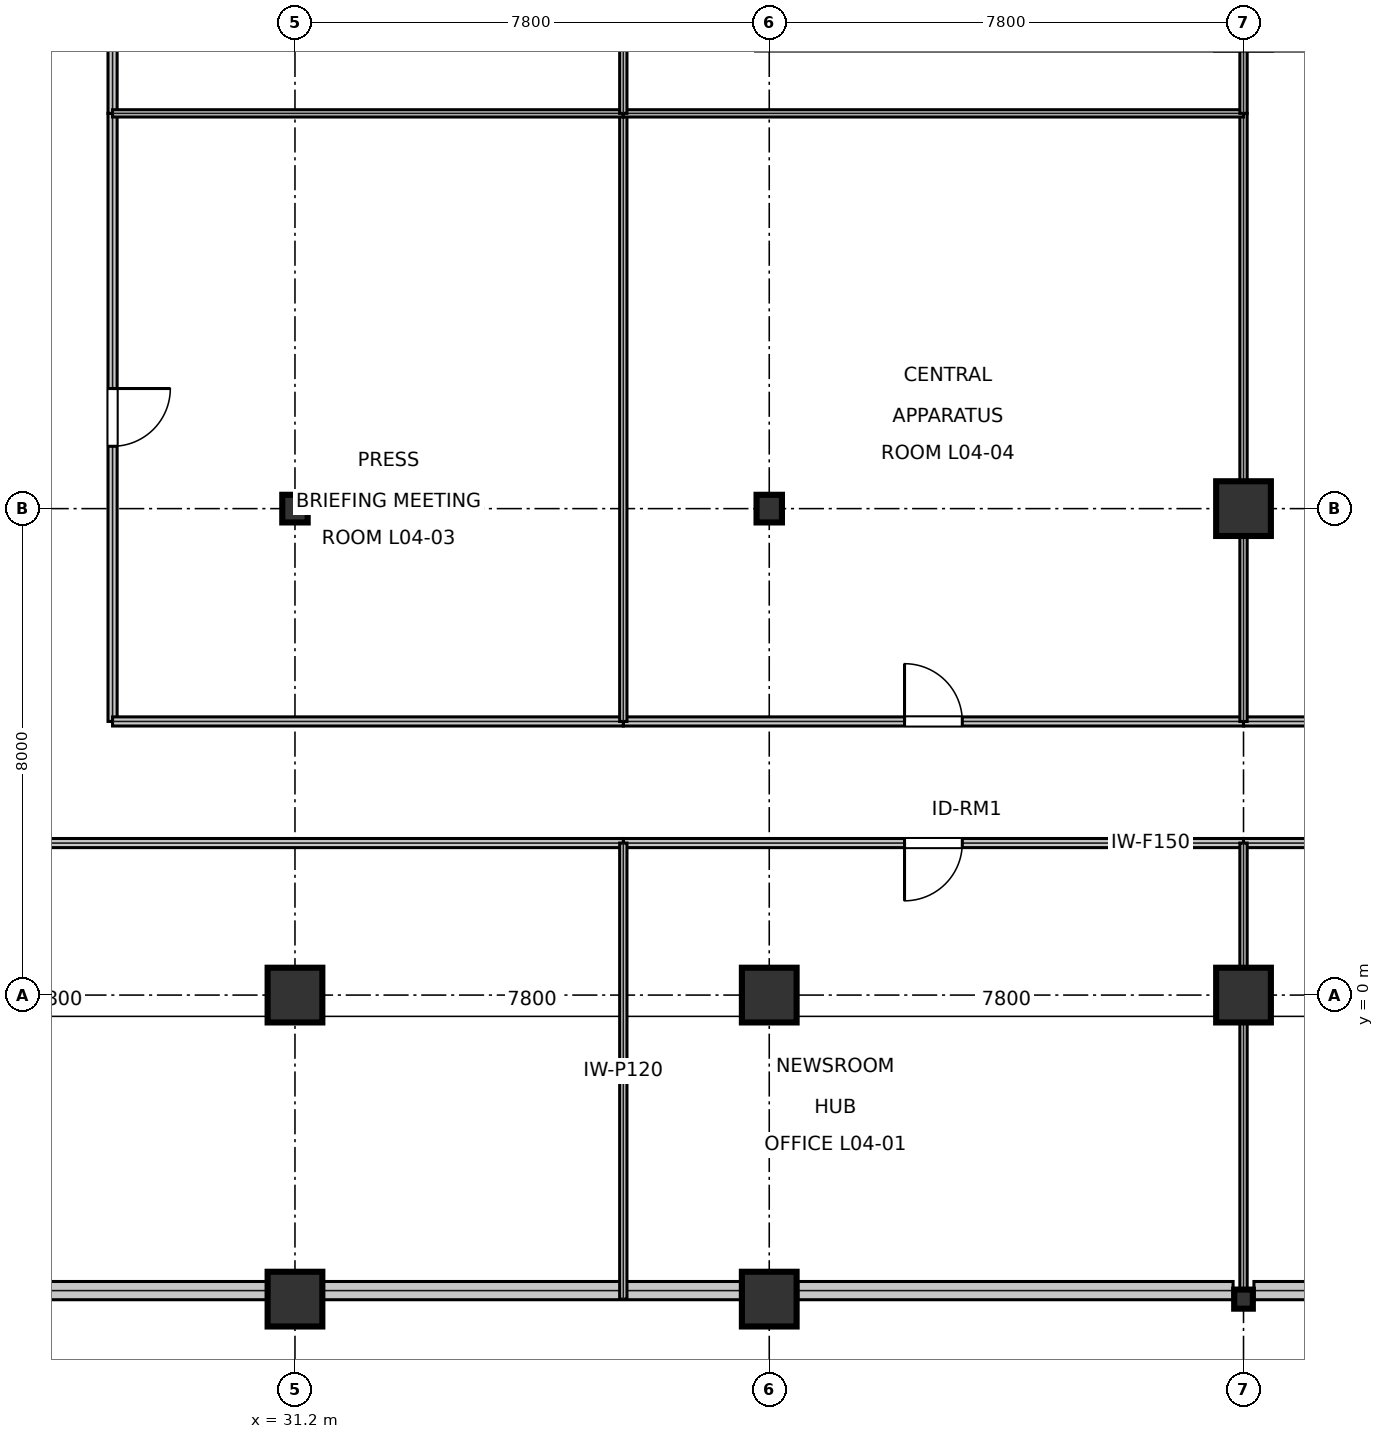
"""IFC4 building model, lengths in metres.
Left out: names, types, materials, properties, quantities, classifications, styles, units other than length and angle.
Written with IfcOpenShell. Run it as: python <this file> out.ifc"""

import sys

from ifc_helpers import new_model, si_unit, direction, frame, frame_2d, origin, origin_2d, place, context, subcontext, project, spatial, rectangle, i_section, extrude, element, fill, save


model = new_model("IFC4")
c1 = context("Model", 3, precision=1e-05, world=origin(), true_north=direction((0.0, 1.0)))
c2 = subcontext(c1, "Body", "Model", "MODEL_VIEW")
j1 = project(units=[si_unit("LENGTHUNIT", "METRE"), si_unit("PLANEANGLEUNIT", "RADIAN")], contexts=[c1])
p1 = place(None, origin())
s1 = spatial("IfcSite", under=j1, at=p1, CompositionType="ELEMENT")
p2 = place(p1, origin())
s2 = spatial("IfcBuilding", under=s1, at=p2, CompositionType="ELEMENT")
p3 = place(p2, frame((0.0, 0.0, 21.6)))
s3 = spatial("IfcBuildingStorey", under=s2, at=p3, CompositionType="ELEMENT", Elevation=21.6)
for number, where, z_axis, x_axis in (
    (1, (31.2, -5.0, 0.0), (0.0, 0.0, 1.0), (1.0, 0.0, 0.0)),
    (2, (31.2, 0.0, 0.0), (0.0, 0.0, 1.0), (1.0, 0.0, 0.0)),
):
    element("IfcColumn", number, at=place(p3, frame(where, z_axis=z_axis, x_axis=x_axis)), inside=s3, PredefinedType="COLUMN", context=c2, shape_type="SweptSolid", body=[
        extrude(rectangle(XDim=0.9, YDim=0.9, at=origin_2d()), origin(), (0.0, 0.0, 1.0), 5.395),
    ])
p4 = place(p3, frame((31.2, 8.0, 0.0), z_axis=(0.0, 0.0, 1.0), x_axis=(1.0, 0.0, 0.0)))
e3 = element("IfcColumn", 3, at=p4, inside=s3, PredefinedType="COLUMN", context=c2, shape_type="SweptSolid", body=[
    extrude(i_section(OverallWidth=0.418, OverallDepth=0.455, WebThickness=0.042, FlangeThickness=0.068, at=origin_2d()), origin(), (0.0, 0.0, 1.0), 5.395),
])
for number, where, z_axis, x_axis in (
    (4, (39.0, -5.0, 0.0), (0.0, 0.0, 1.0), (1.0, 0.0, 0.0)),
    (5, (39.0, 0.0, 0.0), (0.0, 0.0, 1.0), (1.0, 0.0, 0.0)),
):
    element("IfcColumn", number, at=place(p3, frame(where, z_axis=z_axis, x_axis=x_axis)), inside=s3, PredefinedType="COLUMN", context=c2, shape_type="SweptSolid", body=[
        extrude(rectangle(XDim=0.9, YDim=0.9, at=origin_2d()), origin(), (0.0, 0.0, 1.0), 5.395),
    ])
p5 = place(p3, frame((39.0, 8.0, 0.0), z_axis=(0.0, 0.0, 1.0), x_axis=(1.0, 0.0, 0.0)))
e6 = element("IfcColumn", 6, at=p5, inside=s3, PredefinedType="COLUMN", context=c2, shape_type="SweptSolid", body=[
    extrude(i_section(OverallWidth=0.418, OverallDepth=0.455, WebThickness=0.042, FlangeThickness=0.068, at=origin_2d()), origin(), (0.0, 0.0, 1.0), 5.395),
])
p6 = place(p3, frame((46.8, -5.0, 0.0), z_axis=(0.0, 0.0, 1.0), x_axis=(1.0, 0.0, 0.0)))
e7 = element("IfcColumn", 7, at=p6, inside=s3, PredefinedType="COLUMN", context=c2, shape_type="SweptSolid", body=[
    extrude(i_section(OverallWidth=0.307, OverallDepth=0.314, WebThickness=0.011, FlangeThickness=0.019, at=origin_2d()), origin(), (0.0, 0.0, 1.0), 5.395),
])
for number, where, z_axis, x_axis in (
    (8, (46.8, 0.0, 0.0), (0.0, 0.0, 1.0), (1.0, 0.0, 0.0)),
    (9, (46.8, 8.0, 0.0), (0.0, 0.0, 1.0), (1.0, 0.0, 0.0)),
):
    element("IfcColumn", number, at=place(p3, frame(where, z_axis=z_axis, x_axis=x_axis)), inside=s3, PredefinedType="COLUMN", context=c2, shape_type="SweptSolid", body=[
        extrude(rectangle(XDim=0.9, YDim=0.9, at=origin_2d()), origin(), (0.0, 0.0, 1.0), 5.395),
    ])
for number, where, z_axis, x_axis in (
    (10, (23.868, -4.86, 0.0), (0.0, 0.0, 1.0), (1.0, 0.0, 0.0)),
    (11, (31.668, -4.86, 0.0), (0.0, 0.0, 1.0), (1.0, 0.0, 0.0)),
):
    element("IfcWall", number, at=place(p3, frame(where, z_axis=z_axis, x_axis=x_axis)), inside=s3, PredefinedType="STANDARD", context=c2, shape_type="SweptSolid", body=[
        extrude(rectangle(XDim=6.864, YDim=0.3, at=frame_2d((3.432, 0.0))), origin(), (0.0, 0.0, 1.0), 4.608),
    ])
p7 = place(p3, frame((39.468, -4.86, 0.0), z_axis=(0.0, 0.0, 1.0), x_axis=(1.0, 0.0, 0.0)))
e12 = element("IfcWall", 12, at=p7, inside=s3, PredefinedType="STANDARD", context=c2, shape_type="SweptSolid", body=[
    extrude(rectangle(XDim=7.16, YDim=0.3, at=frame_2d((3.58, 0.0))), origin(), (0.0, 0.0, 1.0), 4.608),
])
p8 = place(p3, frame((46.971, -4.86, 0.0), z_axis=(0.0, 0.0, 1.0), x_axis=(1.0, 0.0, 0.0)))
e13 = element("IfcWall", 13, at=p8, inside=s3, PredefinedType="STANDARD", context=c2, shape_type="SweptSolid", body=[
    extrude(rectangle(XDim=7.161, YDim=0.3, at=frame_2d((3.58, 0.0))), origin(), (0.0, 0.0, 1.0), 4.608),
])
p9 = place(p3, frame((36.6, 2.5, 0.0), z_axis=(0.0, 0.0, 1.0), x_axis=(1.0, 0.0, 0.0)))
e14 = element("IfcWall", 14, at=p9, inside=s3, PredefinedType="PARTITIONING", context=c2, shape_type="SweptSolid", body=[
    extrude(rectangle(XDim=10.2, YDim=0.15, at=frame_2d((5.1, 0.0))), origin(), (0.0, 0.0, 1.0), 4.375),
])
p10 = place(p9, frame((4.625, 0.0, 0.0)))
e15 = element("IfcOpeningElement", 15, at=p10, cuts=e14, PredefinedType="OPENING", context=c2, shape_type="SweptSolid", body=[
    extrude(rectangle(XDim=0.95, YDim=2.15, at=frame_2d((0.475, 1.075))), frame((0.0, 0.085, 0.0), z_axis=(0.0, -1.0, 0.0), x_axis=(1.0, 0.0, 0.0)), (0.0, 0.0, 1.0), 0.17),
])
p11 = place(p3, frame((28.2, 4.5, 0.0), z_axis=(0.0, 0.0, 1.0), x_axis=(0.0, 1.0, 0.0)))
e16 = element("IfcWall", 16, at=p11, inside=s3, PredefinedType="PARTITIONING", context=c2, shape_type="SweptSolid", body=[
    extrude(rectangle(XDim=10.0, YDim=0.15, at=frame_2d((5.0, 0.0))), origin(), (0.0, 0.0, 1.0), 4.298),
])
p12 = place(p11, frame((4.525, 0.0, 0.0)))
e17 = element("IfcOpeningElement", 17, at=p12, cuts=e16, PredefinedType="OPENING", context=c2, shape_type="SweptSolid", body=[
    extrude(rectangle(XDim=0.95, YDim=2.15, at=frame_2d((0.475, 1.075))), frame((0.0, 0.085, 0.0), z_axis=(0.0, -1.0, 0.0), x_axis=(1.0, 0.0, 0.0)), (0.0, 0.0, 1.0), 0.17),
])
p13 = place(p3, frame((36.6, 4.5, 0.0), z_axis=(0.0, 0.0, 1.0), x_axis=(1.0, 0.0, 0.0)))
e18 = element("IfcWall", 18, at=p13, inside=s3, PredefinedType="PARTITIONING", context=c2, shape_type="SweptSolid", body=[
    extrude(rectangle(XDim=10.2, YDim=0.15, at=frame_2d((5.1, 0.0))), origin(), (0.0, 0.0, 1.0), 4.375),
])
p14 = place(p13, frame((4.625, 0.0, 0.0)))
e19 = element("IfcOpeningElement", 19, at=p14, cuts=e18, PredefinedType="OPENING", context=c2, shape_type="SweptSolid", body=[
    extrude(rectangle(XDim=0.95, YDim=2.15, at=frame_2d((0.475, 1.075))), frame((0.0, 0.085, 0.0), z_axis=(0.0, -1.0, 0.0), x_axis=(1.0, 0.0, 0.0)), (0.0, 0.0, 1.0), 0.17),
])
p15 = place(p3, frame((46.8, 4.5, 0.0), z_axis=(0.0, 0.0, 1.0), x_axis=(1.0, 0.0, 0.0)))
e20 = element("IfcWall", 20, at=p15, inside=s3, PredefinedType="PARTITIONING", context=c2, shape_type="SweptSolid", body=[
    extrude(rectangle(XDim=5.7, YDim=0.15, at=frame_2d((2.85, 0.0))), origin(), (0.0, 0.0, 1.0), 4.375),
])
p16 = place(p15, frame((2.375, 0.0, 0.0)))
e21 = element("IfcOpeningElement", 21, at=p16, cuts=e20, PredefinedType="OPENING", context=c2, shape_type="SweptSolid", body=[
    extrude(rectangle(XDim=0.95, YDim=2.15, at=frame_2d((0.475, 1.075))), frame((0.0, 0.085, 0.0), z_axis=(0.0, -1.0, 0.0), x_axis=(1.0, 0.0, 0.0)), (0.0, 0.0, 1.0), 0.17),
])
p17 = place(p3, frame((28.2, 14.5, 0.0), z_axis=(0.0, 0.0, 1.0), x_axis=(0.0, 1.0, 0.0)))
e22 = element("IfcWall", 22, at=p17, inside=s3, PredefinedType="PARTITIONING", context=c2, shape_type="SweptSolid", body=[
    extrude(rectangle(XDim=11.7, YDim=0.15, at=frame_2d((5.85, 0.0))), origin(), (0.0, 0.0, 1.0), 3.648),
])
p18 = place(p17, frame((5.375, 0.0, 0.0)))
e23 = element("IfcOpeningElement", 23, at=p18, cuts=e22, PredefinedType="OPENING", context=c2, shape_type="SweptSolid", body=[
    extrude(rectangle(XDim=0.95, YDim=2.15, at=frame_2d((0.475, 1.075))), frame((0.0, 0.085, 0.0), z_axis=(0.0, -1.0, 0.0), x_axis=(1.0, 0.0, 0.0)), (0.0, 0.0, 1.0), 0.17),
])
p19 = place(p3, frame((26.2, 2.5, 0.0), z_axis=(0.0, 0.0, 1.0), x_axis=(1.0, 0.0, 0.0)))
e24 = element("IfcWall", 24, at=p19, inside=s3, PredefinedType="PARTITIONING", context=c2, shape_type="SweptSolid", body=[
    extrude(rectangle(XDim=10.4, YDim=0.15, at=frame_2d((5.2, 0.0))), origin(), (0.0, 0.0, 1.0), 4.375),
])
p20 = place(p3, frame((28.2, 4.5, 0.0), z_axis=(0.0, 0.0, 1.0), x_axis=(1.0, 0.0, 0.0)))
e25 = element("IfcWall", 25, at=p20, inside=s3, PredefinedType="PARTITIONING", context=c2, shape_type="SweptSolid", body=[
    extrude(rectangle(XDim=8.4, YDim=0.15, at=frame_2d((4.2, 0.0))), origin(), (0.0, 0.0, 1.0), 4.375),
])
p21 = place(p3, frame((46.8, 2.5, 0.0), z_axis=(0.0, 0.0, 1.0), x_axis=(1.0, 0.0, 0.0)))
e26 = element("IfcWall", 26, at=p21, inside=s3, PredefinedType="PARTITIONING", context=c2, shape_type="SweptSolid", body=[
    extrude(rectangle(XDim=5.7, YDim=0.15, at=frame_2d((2.85, 0.0))), origin(), (0.0, 0.0, 1.0), 4.375),
])
for number, where, z_axis, x_axis in (
    (27, (36.6, -5.0, 0.0), (0.0, 0.0, 1.0), (0.0, 1.0, 0.0)),
    (28, (46.8, -5.0, 0.0), (0.0, 0.0, 1.0), (0.0, 1.0, 0.0)),
):
    element("IfcWall", number, at=place(p3, frame(where, z_axis=z_axis, x_axis=x_axis)), inside=s3, PredefinedType="PARTITIONING", context=c2, shape_type="SweptSolid", body=[
        extrude(rectangle(XDim=7.5, YDim=0.12, at=frame_2d((3.75, 0.0))), origin(), (0.0, 0.0, 1.0), 4.298),
    ])
p22 = place(p3, frame((36.6, 4.5, 0.0), z_axis=(0.0, 0.0, 1.0), x_axis=(0.0, 1.0, 0.0)))
e29 = element("IfcWall", 29, at=p22, inside=s3, PredefinedType="PARTITIONING", context=c2, shape_type="SweptSolid", body=[
    extrude(rectangle(XDim=10.0, YDim=0.12, at=frame_2d((5.0, 0.0))), origin(), (0.0, 0.0, 1.0), 4.298),
])
p23 = place(p3, frame((28.2, 14.5, 0.0), z_axis=(0.0, 0.0, 1.0), x_axis=(1.0, 0.0, 0.0)))
e30 = element("IfcWall", 30, at=p23, inside=s3, PredefinedType="PARTITIONING", context=c2, shape_type="SweptSolid", body=[
    extrude(rectangle(XDim=8.4, YDim=0.12, at=frame_2d((4.2, 0.0))), origin(), (0.0, 0.0, 1.0), 3.648),
])
p24 = place(p3, frame((46.8, 4.5, 0.0), z_axis=(0.0, 0.0, 1.0), x_axis=(0.0, 1.0, 0.0)))
e31 = element("IfcWall", 31, at=p24, inside=s3, PredefinedType="PARTITIONING", context=c2, shape_type="SweptSolid", body=[
    extrude(rectangle(XDim=10.0, YDim=0.12, at=frame_2d((5.0, 0.0))), origin(), (0.0, 0.0, 1.0), 4.298),
])
p25 = place(p3, frame((36.6, 14.5, 0.0), z_axis=(0.0, 0.0, 1.0), x_axis=(1.0, 0.0, 0.0)))
e32 = element("IfcWall", 32, at=p25, inside=s3, PredefinedType="PARTITIONING", context=c2, shape_type="SweptSolid", body=[
    extrude(rectangle(XDim=10.2, YDim=0.12, at=frame_2d((5.1, 0.0))), origin(), (0.0, 0.0, 1.0), 4.375),
])
p26 = place(p3, frame((46.8, 14.5, 0.0), z_axis=(0.0, 0.0, 1.0), x_axis=(0.0, 1.0, 0.0)))
e33 = element("IfcWall", 33, at=p26, inside=s3, PredefinedType="PARTITIONING", context=c2, shape_type="SweptSolid", body=[
    extrude(rectangle(XDim=1.1, YDim=0.12, at=frame_2d((0.55, 0.0))), origin(), (0.0, 0.0, 1.0), 4.375),
])
p27 = place(p3, frame((36.6, 14.5, 0.0), z_axis=(0.0, 0.0, 1.0), x_axis=(0.0, 1.0, 0.0)))
e34 = element("IfcWall", 34, at=p27, inside=s3, PredefinedType="PARTITIONING", context=c2, shape_type="SweptSolid", body=[
    extrude(rectangle(XDim=11.7, YDim=0.12, at=frame_2d((5.85, 0.0))), origin(), (0.0, 0.0, 1.0), 3.648),
])
p28 = place(p10, frame((0.95, 0.0, 0.0), z_axis=(0.0, 0.0, 1.0), x_axis=(-1.0, 0.0, 0.0)))
e35 = element("IfcDoor", 35, at=p28, inside=s3, OperationType="SINGLE_SWING_RIGHT", PredefinedType="DOOR", context=c2, shape_type="SweptSolid", body=[
    extrude(rectangle(XDim=0.95, YDim=2.15, at=frame_2d((0.475, 1.075))), frame((0.0, 0.025, 0.0), z_axis=(0.0, -1.0, 0.0), x_axis=(1.0, 0.0, 0.0)), (0.0, 0.0, 1.0), 0.05),
])
fill(e15, e35)
p29 = place(p12, frame((0.95, 0.0, 0.0), z_axis=(0.0, 0.0, 1.0), x_axis=(-1.0, 0.0, 0.0)))
e36 = element("IfcDoor", 36, at=p29, inside=s3, OperationType="SINGLE_SWING_LEFT", PredefinedType="DOOR", context=c2, shape_type="SweptSolid", body=[
    extrude(rectangle(XDim=0.95, YDim=2.15, at=frame_2d((0.475, 1.075))), frame((0.0, 0.025, 0.0), z_axis=(0.0, -1.0, 0.0), x_axis=(1.0, 0.0, 0.0)), (0.0, 0.0, 1.0), 0.05),
])
fill(e17, e36)
p30 = place(p14, origin())
e37 = element("IfcDoor", 37, at=p30, inside=s3, OperationType="SINGLE_SWING_LEFT", PredefinedType="DOOR", context=c2, shape_type="SweptSolid", body=[
    extrude(rectangle(XDim=0.95, YDim=2.15, at=frame_2d((0.475, 1.075))), frame((0.0, 0.025, 0.0), z_axis=(0.0, -1.0, 0.0), x_axis=(1.0, 0.0, 0.0)), (0.0, 0.0, 1.0), 0.05),
])
fill(e19, e37)
save(model, sys.argv[1])
